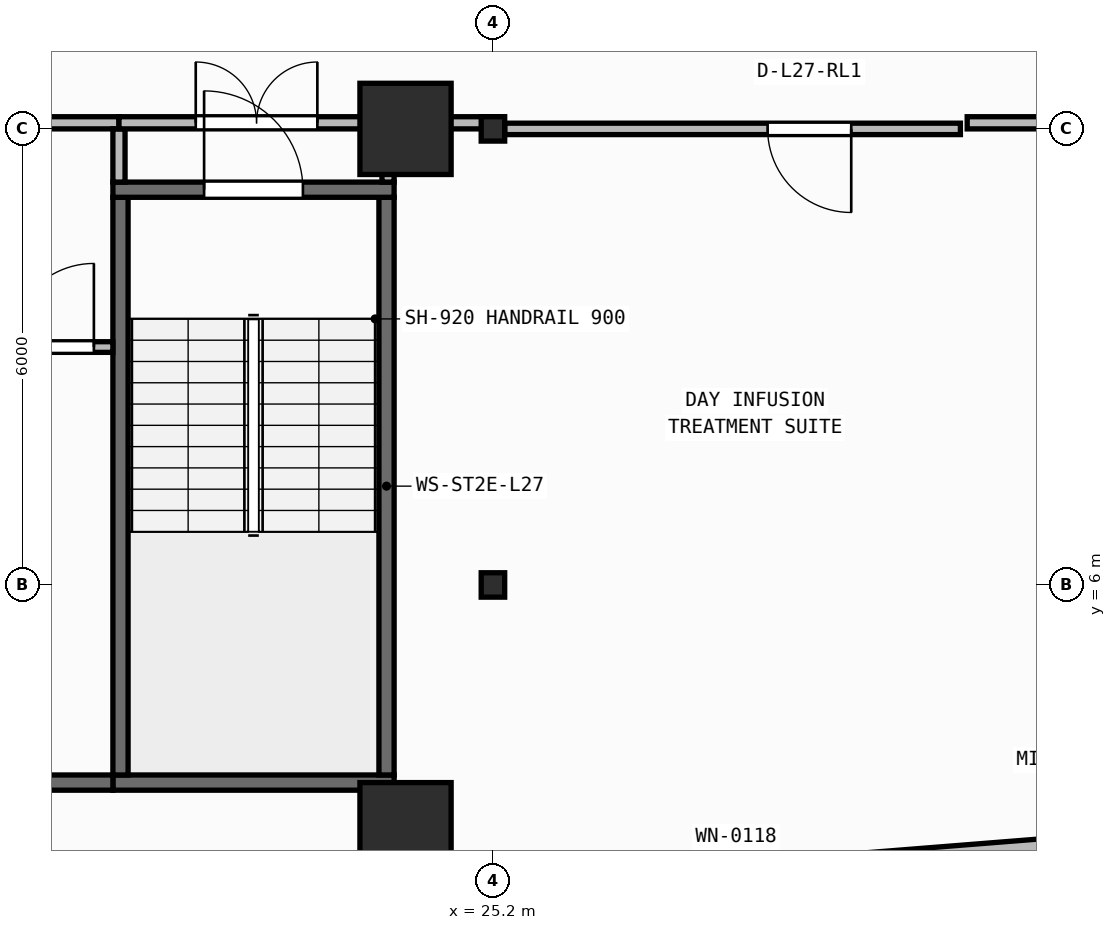
"""IFC4 building model, lengths in metres.
Left out: names, types, materials, properties, quantities, classifications, styles, units other than length and angle.
Written with IfcOpenShell. Run it as: python <this file> out.ifc"""

import sys

from ifc_helpers import new_model, si_unit, direction, frame, frame_2d, origin, origin_2d, place, context, subcontext, project, spatial, rectangle, i_section, extrude, element, fill, save


model = new_model("IFC4")
c1 = context("Model", 3, precision=1e-05, world=origin(), true_north=direction((0.0, 1.0)))
c2 = subcontext(c1, "Body", "Model", "MODEL_VIEW")
j1 = project(units=[si_unit("LENGTHUNIT", "METRE"), si_unit("PLANEANGLEUNIT", "RADIAN")], contexts=[c1])
p1 = place(None, origin())
s1 = spatial("IfcSite", under=j1, at=p1, CompositionType="ELEMENT")
p2 = place(p1, origin())
s2 = spatial("IfcBuilding", under=s1, at=p2, CompositionType="ELEMENT")
p3 = place(p2, frame((0.0, 0.0, 111.25)))
s3 = spatial("IfcBuildingStorey", under=s2, at=p3, CompositionType="ELEMENT", Elevation=111.25)
p4 = place(p3, frame((24.05, 2.8, 0.0), z_axis=(0.0, 0.0, 1.0), x_axis=(1.0, 0.0, 0.0)))
e1 = element("IfcColumn", 1, at=p4, inside=s3, PredefinedType="COLUMN", context=c2, shape_type="SweptSolid", body=[
    extrude(rectangle(XDim=1.2, YDim=1.2, at=origin_2d()), origin(), (0.0, 0.0, 1.0), 3.95),
])
p5 = place(p3, frame((25.2, 6.0, 0.0), z_axis=(0.0, 0.0, 1.0), x_axis=(1.0, 0.0, 0.0)))
e2 = element("IfcColumn", 2, at=p5, inside=s3, PredefinedType="COLUMN", context=c2, shape_type="SweptSolid", body=[
    extrude(i_section(OverallWidth=0.309, OverallDepth=0.321, WebThickness=0.014, FlangeThickness=0.022, FilletRadius=0.017, at=origin_2d()), origin(), (0.0, 0.0, 1.0), 3.95),
])
p6 = place(p3, frame((24.05, 12.0, 0.0), z_axis=(0.0, 0.0, 1.0), x_axis=(1.0, 0.0, 0.0)))
e3 = element("IfcColumn", 3, at=p6, inside=s3, PredefinedType="COLUMN", context=c2, shape_type="SweptSolid", body=[
    extrude(rectangle(XDim=1.2, YDim=1.2, at=origin_2d()), origin(), (0.0, 0.0, 1.0), 3.95),
])
p7 = place(p3, frame((25.2, 12.0, 0.0), z_axis=(0.0, 0.0, 1.0), x_axis=(1.0, 0.0, 0.0)))
e4 = element("IfcColumn", 4, at=p7, inside=s3, PredefinedType="COLUMN", context=c2, shape_type="SweptSolid", body=[
    extrude(i_section(OverallWidth=0.309, OverallDepth=0.321, WebThickness=0.014, FlangeThickness=0.022, FilletRadius=0.017, at=origin_2d()), origin(), (0.0, 0.0, 1.0), 3.95),
])
p8 = place(p3, frame((2.76, 0.173, 0.0), z_axis=(0.0, 0.0, 1.0), x_axis=(0.996857931723, 0.079210251617, 0.0)))
e5 = element("IfcWall", 5, at=p8, inside=s3, PredefinedType="STANDARD", context=c2, shape_type="SweptSolid", body=[
    extrude(rectangle(XDim=51.442, YDim=0.26, at=frame_2d((25.721, 0.0))), origin(), (0.0, 0.0, 1.0), 3.71),
])
p9 = place(p8, frame((24.521, 0.0, 0.9)))
e6 = element("IfcOpeningElement", 6, at=p9, cuts=e5, PredefinedType="OPENING", context=c2, shape_type="SweptSolid", body=[
    extrude(rectangle(XDim=2.4, YDim=1.65, at=frame_2d((1.2, 0.825))), frame((0.0, 0.14, 0.0), z_axis=(0.0, -1.0, 0.0), x_axis=(1.0, 0.0, 0.0)), (0.0, 0.0, 1.0), 0.28),
])
p10 = place(p3, frame((20.2, 3.4, 0.0), z_axis=(0.0, 0.0, 1.0), x_axis=(1.0, 0.0, 0.0)))
e7 = element("IfcWall", 7, at=p10, inside=s3, PredefinedType="SHEAR", context=c2, shape_type="SweptSolid", body=[
    extrude(rectangle(XDim=3.7, YDim=0.2, at=frame_2d((1.85, 0.0))), origin(), (0.0, 0.0, 1.0), 3.71),
])
for number, where, z_axis, x_axis in (
    (8, (20.3, 3.5, 0.0), (0.0, 0.0, 1.0), (0.0, 1.0, 0.0)),
    (9, (23.8, 3.5, 0.0), (0.0, 0.0, 1.0), (0.0, 1.0, 0.0)),
):
    element("IfcWall", number, at=place(p3, frame(where, z_axis=z_axis, x_axis=x_axis)), inside=s3, PredefinedType="SHEAR", context=c2, shape_type="SweptSolid", body=[
        extrude(rectangle(XDim=7.6, YDim=0.2, at=frame_2d((3.8, 0.0))), origin(), (0.0, 0.0, 1.0), 3.71),
    ])
p11 = place(p3, frame((20.2, 11.2, 0.0), z_axis=(0.0, 0.0, 1.0), x_axis=(1.0, 0.0, 0.0)))
e10 = element("IfcWall", 10, at=p11, inside=s3, PredefinedType="SHEAR", context=c2, shape_type="SweptSolid", body=[
    extrude(rectangle(XDim=3.7, YDim=0.2, at=frame_2d((1.85, 0.0))), origin(), (0.0, 0.0, 1.0), 3.71),
])
p12 = place(p11, frame((1.2, 0.0, 0.0)))
e11 = element("IfcOpeningElement", 11, at=p12, cuts=e10, PredefinedType="OPENING", context=c2, shape_type="SweptSolid", body=[
    extrude(rectangle(XDim=1.3, YDim=2.15, at=frame_2d((0.65, 1.075))), frame((0.0, 0.11, 0.0), z_axis=(0.0, -1.0, 0.0), x_axis=(1.0, 0.0, 0.0)), (0.0, 0.0, 1.0), 0.22),
])
p13 = place(p3, frame((6.5, 3.4, 0.0), z_axis=(0.0, 0.0, 1.0), x_axis=(1.0, 0.0, 0.0)))
e12 = element("IfcWall", 12, at=p13, inside=s3, PredefinedType="SHEAR", context=c2, shape_type="SweptSolid", body=[
    extrude(rectangle(XDim=13.7, YDim=0.2, at=frame_2d((6.85, 0.0))), origin(), (0.0, 0.0, 1.0), 3.71),
])
p14 = place(p3, frame((18.61, 9.13, 0.0), z_axis=(0.0, 0.0, 1.0), x_axis=(1.0, 0.0, 0.0)))
e13 = element("IfcWall", 13, at=p14, inside=s3, PredefinedType="PARTITIONING", context=c2, shape_type="SweptSolid", body=[
    extrude(rectangle(XDim=1.59, YDim=0.14, at=frame_2d((0.795, 0.0))), origin(), (0.0, 0.0, 1.0), 3.71),
])
p15 = place(p14, frame((0.24, 0.0, 0.0)))
e14 = element("IfcOpeningElement", 14, at=p15, cuts=e13, PredefinedType="OPENING", context=c2, shape_type="SweptSolid", body=[
    extrude(rectangle(XDim=1.1, YDim=2.1, at=frame_2d((0.55, 1.05))), frame((0.0, 0.08, 0.0), z_axis=(0.0, -1.0, 0.0), x_axis=(1.0, 0.0, 0.0)), (0.0, 0.0, 1.0), 0.16),
])
p16 = place(p3, frame((12.58, 12.08, 0.0), z_axis=(0.0, 0.0, 1.0), x_axis=(1.0, 0.0, 0.0)))
e15 = element("IfcWall", 15, at=p16, inside=s3, PredefinedType="PARTITIONING", context=c2, shape_type="SweptSolid", body=[
    extrude(rectangle(XDim=7.7, YDim=0.16, at=frame_2d((3.85, 0.0))), origin(), (0.0, 0.0, 1.0), 3.083),
])
p17 = place(p16, frame((3.05, 0.0, 0.0)))
e16 = element("IfcOpeningElement", 16, at=p17, cuts=e15, PredefinedType="OPENING", context=c2, shape_type="SweptSolid", body=[
    extrude(rectangle(XDim=1.6, YDim=2.05, at=frame_2d((0.8, 1.025))), frame((0.0, 0.09, 0.0), z_axis=(0.0, -1.0, 0.0), x_axis=(1.0, 0.0, 0.0)), (0.0, 0.0, 1.0), 0.18),
])
p18 = place(p3, frame((20.28, 11.3, 0.0), z_axis=(0.0, 0.0, 1.0), x_axis=(0.0, 1.0, 0.0)))
e17 = element("IfcWall", 17, at=p18, inside=s3, PredefinedType="PARTITIONING", context=c2, shape_type="SweptSolid", body=[
    extrude(rectangle(XDim=0.7, YDim=0.16, at=frame_2d((0.35, 0.0))), origin(), (0.0, 0.0, 1.0), 3.71),
])
p19 = place(p3, frame((20.28, 12.08, 0.0), z_axis=(0.0, 0.0, 1.0), x_axis=(1.0, 0.0, 0.0)))
e18 = element("IfcWall", 18, at=p19, inside=s3, PredefinedType="PARTITIONING", context=c2, shape_type="SweptSolid", body=[
    extrude(rectangle(XDim=3.62, YDim=0.16, at=frame_2d((1.81, 0.0))), origin(), (0.0, 0.0, 1.0), 3.083),
])
p20 = place(p19, frame((1.01, 0.0, 0.0)))
e19 = element("IfcOpeningElement", 19, at=p20, cuts=e18, PredefinedType="OPENING", context=c2, shape_type="SweptSolid", body=[
    extrude(rectangle(XDim=1.6, YDim=2.05, at=frame_2d((0.8, 1.025))), frame((0.0, 0.09, 0.0), z_axis=(0.0, -1.0, 0.0), x_axis=(1.0, 0.0, 0.0)), (0.0, 0.0, 1.0), 0.18),
])
p21 = place(p3, frame((23.82, 11.3, 0.0), z_axis=(0.0, 0.0, 1.0), x_axis=(0.0, 1.0, 0.0)))
e20 = element("IfcWall", 20, at=p21, inside=s3, PredefinedType="PARTITIONING", context=c2, shape_type="SweptSolid", body=[
    extrude(rectangle(XDim=0.7, YDim=0.16, at=frame_2d((0.35, 0.0))), origin(), (0.0, 0.0, 1.0), 3.71),
])
p22 = place(p3, frame((31.35, 12.0, 0.0), z_axis=(0.0, 0.0, 1.0), x_axis=(-1.0, 0.0, 0.0)))
e21 = element("IfcWall", 21, at=p22, inside=s3, PredefinedType="PARTITIONING", context=c2, shape_type="SweptSolid", body=[
    extrude(rectangle(XDim=5.996, YDim=0.15, at=frame_2d((2.998, 0.0))), origin(), (0.0, 0.0, 1.0), 3.083),
])
p23 = place(p22, frame((1.436, 0.0, 0.0)))
e22 = element("IfcOpeningElement", 22, at=p23, cuts=e21, PredefinedType="OPENING", context=c2, shape_type="SweptSolid", body=[
    extrude(rectangle(XDim=1.1, YDim=2.1, at=frame_2d((0.55, 1.05))), frame((0.0, 0.085, 0.0), z_axis=(0.0, -1.0, 0.0), x_axis=(1.0, 0.0, 0.0)), (0.0, 0.0, 1.0), 0.17),
])
p24 = place(p3, frame((24.02, 12.08, 0.0), z_axis=(0.0, 0.0, 1.0), x_axis=(1.0, 0.0, 0.0)))
e23 = element("IfcWall", 23, at=p24, inside=s3, PredefinedType="PARTITIONING", context=c2, shape_type="SweptSolid", body=[
    extrude(rectangle(XDim=1.245, YDim=0.16, at=frame_2d((0.623, 0.0))), origin(), (0.0, 0.0, 1.0), 3.083),
])
p25 = place(p3, frame((31.439, 12.08, 0.0), z_axis=(0.0, 0.0, 1.0), x_axis=(1.0, 0.0, 0.0)))
e24 = element("IfcWall", 24, at=p25, inside=s3, PredefinedType="PARTITIONING", context=c2, shape_type="SweptSolid", body=[
    extrude(rectangle(XDim=2.631, YDim=0.16, at=frame_2d((1.315, 0.0))), origin(), (0.0, 0.0, 1.0), 3.083),
])
p26 = place(p12, origin())
e25 = element("IfcDoor", 25, at=p26, inside=s3, OperationType="SINGLE_SWING_LEFT", PredefinedType="DOOR", context=c2, shape_type="SweptSolid", body=[
    extrude(rectangle(XDim=1.3, YDim=2.15, at=frame_2d((0.65, 1.075))), frame((0.0, 0.025, 0.0), z_axis=(0.0, -1.0, 0.0), x_axis=(1.0, 0.0, 0.0)), (0.0, 0.0, 1.0), 0.05),
])
fill(e11, e25)
p27 = place(p15, origin())
e26 = element("IfcDoor", 26, at=p27, inside=s3, OperationType="SINGLE_SWING_RIGHT", PredefinedType="DOOR", context=c2, shape_type="SweptSolid", body=[
    extrude(rectangle(XDim=1.1, YDim=2.1, at=frame_2d((0.55, 1.05))), frame((0.0, 0.025, 0.0), z_axis=(0.0, -1.0, 0.0), x_axis=(1.0, 0.0, 0.0)), (0.0, 0.0, 1.0), 0.05),
])
fill(e14, e26)
p28 = place(p20, origin())
e27 = element("IfcDoor", 27, at=p28, inside=s3, OperationType="DOUBLE_DOOR_SINGLE_SWING", PredefinedType="DOOR", context=c2, shape_type="SweptSolid", body=[
    extrude(rectangle(XDim=1.6, YDim=2.05, at=frame_2d((0.8, 1.025))), frame((0.0, 0.025, 0.0), z_axis=(0.0, -1.0, 0.0), x_axis=(1.0, 0.0, 0.0)), (0.0, 0.0, 1.0), 0.05),
])
fill(e19, e27)
p29 = place(p23, origin())
e28 = element("IfcDoor", 28, at=p29, inside=s3, OperationType="SINGLE_SWING_LEFT", PredefinedType="DOOR", context=c2, shape_type="SweptSolid", body=[
    extrude(rectangle(XDim=1.1, YDim=2.1, at=frame_2d((0.55, 1.05))), frame((0.0, 0.025, 0.0), z_axis=(0.0, -1.0, 0.0), x_axis=(1.0, 0.0, 0.0)), (0.0, 0.0, 1.0), 0.05),
])
fill(e22, e28)
save(model, sys.argv[1])
